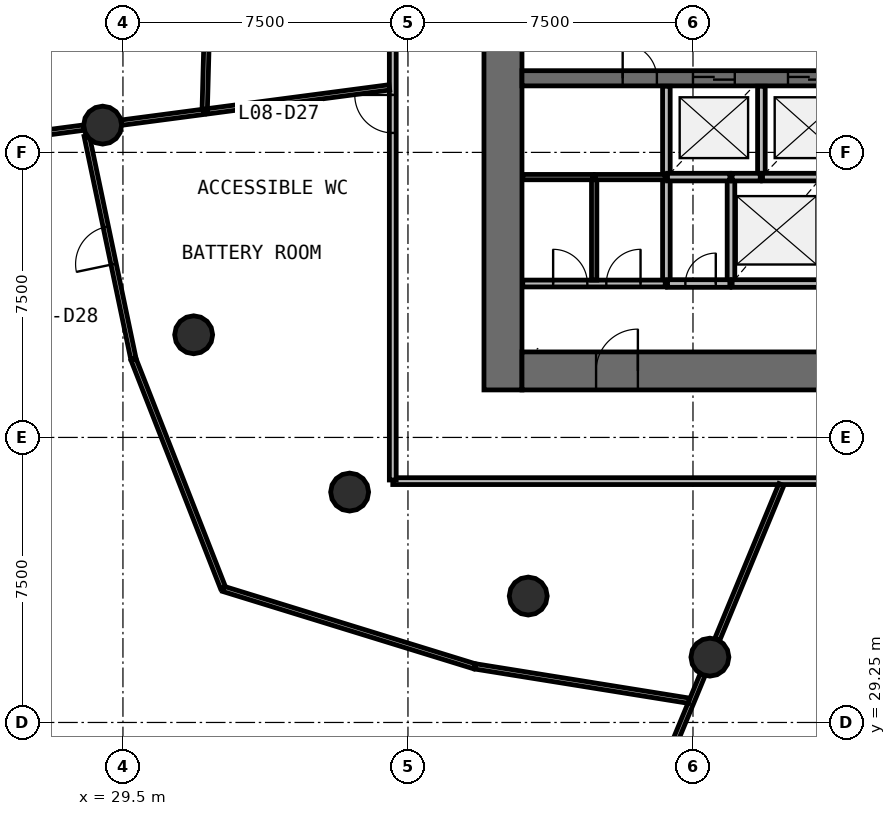
"""IFC4 building model, lengths in metres.
Left out: names, types, materials, properties, quantities, classifications, styles, units other than length and angle.
Written with IfcOpenShell. Run it as: python <this file> out.ifc"""

import sys

from ifc_helpers import new_model, si_unit, direction, frame, frame_2d, origin, origin_2d, place, context, subcontext, project, spatial, rectangle, circle, extrude, source, transform, mapped, element, fill, save


model = new_model("IFC4")
c1 = context("Model", 3, precision=1e-05, world=origin(), true_north=direction((0.0, 1.0)))
c2 = subcontext(c1, "Body", "Model", "MODEL_VIEW")
j1 = project(units=[si_unit("LENGTHUNIT", "METRE"), si_unit("PLANEANGLEUNIT", "RADIAN")], contexts=[c1])
p1 = place(None, origin())
s1 = spatial("IfcSite", under=j1, at=p1, CompositionType="ELEMENT")
p2 = place(p1, origin())
s2 = spatial("IfcBuilding", under=s1, at=p2, CompositionType="ELEMENT")
p3 = place(p2, frame((0.0, 0.0, 35.8)))
s3 = spatial("IfcBuildingStorey", under=s2, at=p3, CompositionType="ELEMENT", Elevation=35.8)
p4 = place(p3, frame((39.5, 58.0, 0.0), z_axis=(0.0, 0.0, 1.0), x_axis=(0.0, -1.0, 0.0)))
e1 = element("IfcWall", 1, at=p4, inside=s3, PredefinedType="SHEAR", context=c2, shape_type="SweptSolid", body=[
    extrude(rectangle(XDim=20.0, YDim=1.0, at=frame_2d((10.0, 0.0))), origin(), (0.0, 0.0, 1.0), 4.4),
])
p5 = place(p4, frame((9.1, 0.0, 0.0)))
e2 = element("IfcOpeningElement", 2, at=p5, cuts=e1, PredefinedType="OPENING", context=c2, shape_type="SweptSolid", body=[
    extrude(rectangle(XDim=1.8, YDim=2.1, at=frame_2d((0.9, 1.05))), frame((0.0, 0.51, 0.0), z_axis=(0.0, -1.0, 0.0), x_axis=(1.0, 0.0, 0.0)), (0.0, 0.0, 1.0), 1.02),
])
p6 = place(p3, frame((40.0, 38.5, 0.0), z_axis=(0.0, 0.0, 1.0), x_axis=(1.0, 0.0, 0.0)))
e3 = element("IfcWall", 3, at=p6, inside=s3, PredefinedType="SHEAR", context=c2, shape_type="SweptSolid", body=[
    extrude(rectangle(XDim=24.0, YDim=1.0, at=frame_2d((12.0, 0.0))), origin(), (0.0, 0.0, 1.0), 4.4),
])
p7 = place(p6, frame((21.45, 0.0, 0.0)))
e4 = element("IfcOpeningElement", 4, at=p7, cuts=e3, PredefinedType="OPENING", context=c2, shape_type="SweptSolid", body=[
    extrude(rectangle(XDim=1.1, YDim=2.1, at=frame_2d((0.55, 1.05))), frame((0.0, 0.51, 0.0), z_axis=(0.0, -1.0, 0.0), x_axis=(1.0, 0.0, 0.0)), (0.0, 0.0, 1.0), 1.02),
])
p8 = place(p6, frame((1.95, 0.0, 0.0)))
e5 = element("IfcOpeningElement", 5, at=p8, cuts=e3, PredefinedType="OPENING", context=c2, shape_type="SweptSolid", body=[
    extrude(rectangle(XDim=1.1, YDim=2.1, at=frame_2d((0.55, 1.05))), frame((0.0, 0.51, 0.0), z_axis=(0.0, -1.0, 0.0), x_axis=(1.0, 0.0, 0.0)), (0.0, 0.0, 1.0), 1.02),
])
p9 = place(p3, frame((40.0, 46.2, 0.0), z_axis=(0.0, 0.0, 1.0), x_axis=(1.0, 0.0, 0.0)))
e6 = element("IfcWall", 6, at=p9, inside=s3, PredefinedType="SHEAR", context=c2, shape_type="SweptSolid", body=[
    extrude(rectangle(XDim=24.0, YDim=0.4, at=frame_2d((12.0, 0.0))), origin(), (0.0, 0.0, 1.0), 4.4),
])
p10 = place(p9, frame((4.5, 0.0, 0.0)))
e7 = element("IfcOpeningElement", 7, at=p10, cuts=e6, PredefinedType="OPENING", context=c2, shape_type="SweptSolid", body=[
    extrude(rectangle(XDim=1.1, YDim=2.1, at=frame_2d((0.55, 1.05))), frame((0.0, 0.21, 0.0), z_axis=(0.0, -1.0, 0.0), x_axis=(1.0, 0.0, 0.0)), (0.0, 0.0, 1.0), 0.42),
])
p11 = place(p9, frame((7.0, 0.0, 0.0)))
e8 = element("IfcOpeningElement", 8, at=p11, cuts=e6, PredefinedType="OPENING", context=c2, shape_type="SweptSolid", body=[
    extrude(rectangle(XDim=1.1, YDim=2.1, at=frame_2d((0.55, 1.05))), frame((0.0, 0.21, 0.0), z_axis=(0.0, -1.0, 0.0), x_axis=(1.0, 0.0, 0.0)), (0.0, 0.0, 1.0), 0.42),
])
p12 = place(p9, frame((9.5, 0.0, 0.0)))
e9 = element("IfcOpeningElement", 9, at=p12, cuts=e6, PredefinedType="OPENING", context=c2, shape_type="SweptSolid", body=[
    extrude(rectangle(XDim=1.1, YDim=2.1, at=frame_2d((0.55, 1.05))), frame((0.0, 0.21, 0.0), z_axis=(0.0, -1.0, 0.0), x_axis=(1.0, 0.0, 0.0)), (0.0, 0.0, 1.0), 0.42),
])
p13 = place(p9, frame((20.45, 0.0, 0.0)))
e10 = element("IfcOpeningElement", 10, at=p13, cuts=e6, PredefinedType="OPENING", context=c2, shape_type="SweptSolid", body=[
    extrude(rectangle(XDim=0.9, YDim=2.1, at=frame_2d((0.45, 1.05))), frame((0.0, 0.21, 0.0), z_axis=(0.0, -1.0, 0.0), x_axis=(1.0, 0.0, 0.0)), (0.0, 0.0, 1.0), 0.42),
])
p14 = place(p9, frame((2.65, 0.0, 0.0)))
e11 = element("IfcOpeningElement", 11, at=p14, cuts=e6, PredefinedType="OPENING", context=c2, shape_type="SweptSolid", body=[
    extrude(rectangle(XDim=0.9, YDim=2.1, at=frame_2d((0.45, 1.05))), frame((0.0, 0.21, 0.0), z_axis=(0.0, -1.0, 0.0), x_axis=(1.0, 0.0, 0.0)), (0.0, 0.0, 1.0), 0.42),
])
p15 = place(p9, frame((11.65, 0.0, 0.0)))
e12 = element("IfcOpeningElement", 12, at=p15, cuts=e6, PredefinedType="OPENING", context=c2, shape_type="SweptSolid", body=[
    extrude(rectangle(XDim=0.9, YDim=2.1, at=frame_2d((0.45, 1.05))), frame((0.0, 0.21, 0.0), z_axis=(0.0, -1.0, 0.0), x_axis=(1.0, 0.0, 0.0)), (0.0, 0.0, 1.0), 0.42),
])
m1 = source(origin(), c2, "Body", "SweptSolid", [
    extrude(circle(Radius=0.5, at=origin_2d()), origin(), (0.0, 0.0, 1.0), 4.4),
])
for number, where, z_axis, x_axis in (
    (13, (28.966, 44.968, 0.0), (0.0, 0.0, 1.0), (1.0, 0.0, 0.0)),
    (14, (31.361, 39.451, 0.0), (0.0, 0.0, 1.0), (1.0, 0.0, 0.0)),
    (15, (35.465, 35.312, 0.0), (0.0, 0.0, 1.0), (1.0, 0.0, 0.0)),
    (16, (40.165, 32.576, 0.0), (0.0, 0.0, 1.0), (1.0, 0.0, 0.0)),
    (17, (44.945, 30.969, 0.0), (0.0, 0.0, 1.0), (1.0, 0.0, 0.0)),
):
    element("IfcColumn", number, at=place(p3, frame(where, z_axis=z_axis, x_axis=x_axis)), inside=s3, PredefinedType="COLUMN", context=c2, shape_type="MappedRepresentation", body=[
        mapped(m1, transform((0.0, 0.0, 0.0), scale=1.0)),
    ])
for number, where, z_axis, x_axis in (
    (18, (43.8, 43.6, 0.0), (0.0, 0.0, 1.0), (0.0, -1.0, 0.0)),
    (19, (45.5, 43.6, 0.0), (0.0, 0.0, 1.0), (0.0, -1.0, 0.0)),
):
    element("IfcWall", number, at=place(p3, frame(where, z_axis=z_axis, x_axis=x_axis)), inside=s3, PredefinedType="SOLIDWALL", context=c2, shape_type="SweptSolid", body=[
        extrude(rectangle(XDim=2.8, YDim=0.2, at=frame_2d((1.4, 0.0))), origin(), (0.0, 0.0, 1.0), 3.95),
    ])
p16 = place(p3, frame((45.53, 40.8, 0.0), z_axis=(0.0, 0.0, 1.0), x_axis=(1.0, 0.0, 0.0)))
e20 = element("IfcWall", 20, at=p16, inside=s3, PredefinedType="SOLIDWALL", context=c2, shape_type="SweptSolid", body=[
    extrude(rectangle(XDim=2.34, YDim=0.2, at=frame_2d((1.17, 0.0))), origin(), (0.0, 0.0, 1.0), 3.95),
])
p17 = place(p3, frame((43.8, 45.99, 0.0), z_axis=(0.0, 0.0, 1.0), x_axis=(0.0, -1.0, 0.0)))
e21 = element("IfcWall", 21, at=p17, inside=s3, PredefinedType="SOLIDWALL", context=c2, shape_type="SweptSolid", body=[
    extrude(rectangle(XDim=2.36, YDim=0.2, at=frame_2d((1.18, 0.0))), origin(), (0.0, 0.0, 1.0), 3.95),
])
p18 = place(p3, frame((46.3, 43.6, 0.0), z_axis=(0.0, 0.0, 1.0), x_axis=(0.0, 1.0, 0.0)))
e22 = element("IfcWall", 22, at=p18, inside=s3, PredefinedType="SOLIDWALL", context=c2, shape_type="SweptSolid", body=[
    extrude(rectangle(XDim=2.39, YDim=0.2, at=frame_2d((1.195, 0.0))), origin(), (0.0, 0.0, 1.0), 3.95),
])
p19 = place(p3, frame((43.83, 43.6, 0.0), z_axis=(0.0, 0.0, 1.0), x_axis=(1.0, 0.0, 0.0)))
e23 = element("IfcWall", 23, at=p19, inside=s3, PredefinedType="SOLIDWALL", context=c2, shape_type="SweptSolid", body=[
    extrude(rectangle(XDim=1.64, YDim=0.2, at=frame_2d((0.82, 0.0))), origin(), (0.0, 0.0, 1.0), 3.95),
])
p20 = place(p3, frame((43.83, 40.8, 0.0), z_axis=(0.0, 0.0, 1.0), x_axis=(1.0, 0.0, 0.0)))
e24 = element("IfcWall", 24, at=p20, inside=s3, PredefinedType="SOLIDWALL", context=c2, shape_type="SweptSolid", body=[
    extrude(rectangle(XDim=1.64, YDim=0.2, at=frame_2d((0.82, 0.0))), origin(), (0.0, 0.0, 1.0), 3.95),
])
p21 = place(p20, frame((0.47, 0.0, 0.0)))
e25 = element("IfcOpeningElement", 25, at=p21, cuts=e24, PredefinedType="OPENING", context=c2, shape_type="SweptSolid", body=[
    extrude(rectangle(XDim=0.8, YDim=2.1, at=frame_2d((0.4, 1.05))), frame((0.0, 0.11, 0.0), z_axis=(0.0, -1.0, 0.0), x_axis=(1.0, 0.0, 0.0)), (0.0, 0.0, 1.0), 0.22),
])
p22 = place(p3, frame((46.33, 43.6, 0.0), z_axis=(0.0, 0.0, 1.0), x_axis=(1.0, 0.0, 0.0)))
e26 = element("IfcWall", 26, at=p22, inside=s3, PredefinedType="SOLIDWALL", context=c2, shape_type="SweptSolid", body=[
    extrude(rectangle(XDim=1.54, YDim=0.2, at=frame_2d((0.77, 0.0))), origin(), (0.0, 0.0, 1.0), 3.95),
])
p23 = place(p3, frame((45.53, 43.6, 0.0), z_axis=(0.0, 0.0, 1.0), x_axis=(1.0, 0.0, 0.0)))
e27 = element("IfcWall", 27, at=p23, inside=s3, PredefinedType="SOLIDWALL", context=c2, shape_type="SweptSolid", body=[
    extrude(rectangle(XDim=0.74, YDim=0.2, at=frame_2d((0.37, 0.0))), origin(), (0.0, 0.0, 1.0), 3.95),
])
p24 = place(p3, frame((67.4, 35.6, 0.0), z_axis=(0.0, 0.0, 1.0), x_axis=(-1.0, 0.0, 0.0)))
e28 = element("IfcWall", 28, at=p24, inside=s3, PredefinedType="PARTITIONING", context=c2, shape_type="SweptSolid", body=[
    extrude(rectangle(XDim=30.8, YDim=0.18, at=frame_2d((15.4, 0.0))), origin(), (0.0, 0.0, 1.0), 3.05),
])
p25 = place(p24, frame((14.95, 0.0, 0.0)))
e29 = element("IfcOpeningElement", 29, at=p25, cuts=e28, PredefinedType="OPENING", context=c2, shape_type="SweptSolid", body=[
    extrude(rectangle(XDim=1.0, YDim=2.1, at=frame_2d((0.5, 1.05))), frame((0.0, 0.1, 0.0), z_axis=(0.0, -1.0, 0.0), x_axis=(1.0, 0.0, 0.0)), (0.0, 0.0, 1.0), 0.2),
])
p26 = place(p24, frame((12.55, 0.0, 0.0)))
e30 = element("IfcOpeningElement", 30, at=p26, cuts=e28, PredefinedType="OPENING", context=c2, shape_type="SweptSolid", body=[
    extrude(rectangle(XDim=1.0, YDim=2.1, at=frame_2d((0.5, 1.05))), frame((0.0, 0.1, 0.0), z_axis=(0.0, -1.0, 0.0), x_axis=(1.0, 0.0, 0.0)), (0.0, 0.0, 1.0), 0.2),
])
p27 = place(p3, frame((36.6, 35.63, 0.0), z_axis=(0.0, 0.0, 1.0), x_axis=(0.0, 1.0, 0.0)))
e31 = element("IfcWall", 31, at=p27, inside=s3, PredefinedType="PARTITIONING", context=c2, shape_type="SweptSolid", body=[
    extrude(rectangle(XDim=23.583, YDim=0.18, at=frame_2d((11.791, 0.0))), origin(), (0.0, 0.0, 1.0), 3.05),
])
p28 = place(p27, frame((16.032, 0.0, 0.0)))
e32 = element("IfcOpeningElement", 32, at=p28, cuts=e31, PredefinedType="OPENING", context=c2, shape_type="SweptSolid", body=[
    extrude(rectangle(XDim=0.9, YDim=2.1, at=frame_2d((0.45, 1.05))), frame((0.0, 0.1, 0.0), z_axis=(0.0, -1.0, 0.0), x_axis=(1.0, 0.0, 0.0)), (0.0, 0.0, 1.0), 0.2),
])
p29 = place(p27, frame((13.232, 0.0, 0.0)))
e33 = element("IfcOpeningElement", 33, at=p29, cuts=e31, PredefinedType="OPENING", context=c2, shape_type="SweptSolid", body=[
    extrude(rectangle(XDim=0.9, YDim=2.1, at=frame_2d((0.45, 1.05))), frame((0.0, 0.1, 0.0), z_axis=(0.0, -1.0, 0.0), x_axis=(1.0, 0.0, 0.0)), (0.0, 0.0, 1.0), 0.2),
])
p30 = place(p27, frame((11.433, 0.0, 0.0)))
e34 = element("IfcOpeningElement", 34, at=p30, cuts=e31, PredefinedType="OPENING", context=c2, shape_type="SweptSolid", body=[
    extrude(rectangle(XDim=0.9, YDim=2.1, at=frame_2d((0.45, 1.05))), frame((0.0, 0.1, 0.0), z_axis=(0.0, -1.0, 0.0), x_axis=(1.0, 0.0, 0.0)), (0.0, 0.0, 1.0), 0.2),
])
p31 = place(p27, frame((9.133, 0.0, 0.0)))
e35 = element("IfcOpeningElement", 35, at=p31, cuts=e31, PredefinedType="OPENING", context=c2, shape_type="SweptSolid", body=[
    extrude(rectangle(XDim=1.0, YDim=2.1, at=frame_2d((0.5, 1.05))), frame((0.0, 0.1, 0.0), z_axis=(0.0, -1.0, 0.0), x_axis=(1.0, 0.0, 0.0)), (0.0, 0.0, 1.0), 0.2),
])
p32 = place(p27, frame((19.133, 0.0, 0.0)))
e36 = element("IfcOpeningElement", 36, at=p32, cuts=e31, PredefinedType="OPENING", context=c2, shape_type="SweptSolid", body=[
    extrude(rectangle(XDim=1.0, YDim=2.1, at=frame_2d((0.5, 1.05))), frame((0.0, 0.1, 0.0), z_axis=(0.0, -1.0, 0.0), x_axis=(1.0, 0.0, 0.0)), (0.0, 0.0, 1.0), 0.2),
])
p33 = place(p3, frame((40.02, 40.8, 0.0), z_axis=(0.0, 0.0, 1.0), x_axis=(1.0, 0.0, 0.0)))
e37 = element("IfcWall", 37, at=p33, inside=s3, PredefinedType="PARTITIONING", context=c2, shape_type="SweptSolid", body=[
    extrude(rectangle(XDim=3.75, YDim=0.18, at=frame_2d((1.875, 0.0))), origin(), (0.0, 0.0, 1.0), 3.95),
])
p34 = place(p33, frame((0.8, 0.0, 0.0)))
e38 = element("IfcOpeningElement", 38, at=p34, cuts=e37, PredefinedType="OPENING", context=c2, shape_type="SweptSolid", body=[
    extrude(rectangle(XDim=0.9, YDim=2.1, at=frame_2d((0.45, 1.05))), frame((0.0, 0.1, 0.0), z_axis=(0.0, -1.0, 0.0), x_axis=(1.0, 0.0, 0.0)), (0.0, 0.0, 1.0), 0.2),
])
p35 = place(p33, frame((2.2, 0.0, 0.0)))
e39 = element("IfcOpeningElement", 39, at=p35, cuts=e37, PredefinedType="OPENING", context=c2, shape_type="SweptSolid", body=[
    extrude(rectangle(XDim=0.9, YDim=2.1, at=frame_2d((0.45, 1.05))), frame((0.0, 0.1, 0.0), z_axis=(0.0, -1.0, 0.0), x_axis=(1.0, 0.0, 0.0)), (0.0, 0.0, 1.0), 0.2),
])
p36 = place(p3, frame((28.466, 44.902, 0.0), z_axis=(0.0, 0.0, 1.0), x_axis=(-0.991446586451, -0.130513088287, 0.0)))
e40 = element("IfcWall", 40, at=p36, inside=s3, PredefinedType="PARTITIONING", context=c2, shape_type="SweptSolid", body=[
    extrude(rectangle(XDim=11.86, YDim=0.14, at=frame_2d((5.93, 0.0))), origin(), (0.0, 0.0, 1.0), 3.05),
])
p37 = place(p3, frame((41.247, 22.04, 0.0), z_axis=(0.0, 0.0, 1.0), x_axis=(0.382672728165, 0.923883966264, 0.0)))
e41 = element("IfcWall", 41, at=p37, inside=s3, PredefinedType="PARTITIONING", context=c2, shape_type="SweptSolid", body=[
    extrude(rectangle(XDim=9.16, YDim=0.14, at=frame_2d((4.58, 0.0))), origin(), (0.0, 0.0, 1.0), 3.05),
])
p38 = place(p3, frame((32.145, 32.764, 0.0), z_axis=(0.0, 0.0, 1.0), x_axis=(0.955628382182, -0.294574939816, 0.0)))
e42 = element("IfcWall", 42, at=p38, inside=s3, PredefinedType="PARTITIONING", context=c2, shape_type="SweptSolid", body=[
    extrude(rectangle(XDim=6.91, YDim=0.14, at=frame_2d((3.455, 0.0))), origin(), (0.0, 0.0, 1.0), 3.05),
])
p39 = place(p3, frame((29.78, 38.796, 0.0), z_axis=(0.0, 0.0, 1.0), x_axis=(0.364958848298, -0.931023651176, 0.0)))
e43 = element("IfcWall", 43, at=p39, inside=s3, PredefinedType="PARTITIONING", context=c2, shape_type="SweptSolid", body=[
    extrude(rectangle(XDim=6.449, YDim=0.14, at=frame_2d((3.224, 0.0))), origin(), (0.0, 0.0, 1.0), 3.05),
])
p40 = place(p3, frame((29.774, 38.826, 0.0), z_axis=(0.0, 0.0, 1.0), x_axis=(-0.20499122911, 0.978763810113, 0.0)))
e44 = element("IfcWall", 44, at=p40, inside=s3, PredefinedType="PARTITIONING", context=c2, shape_type="SweptSolid", body=[
    extrude(rectangle(XDim=5.988, YDim=0.14, at=frame_2d((2.994, 0.0))), origin(), (0.0, 0.0, 1.0), 3.05),
])
p41 = place(p40, frame((2.538, 0.0, 0.0)))
e45 = element("IfcOpeningElement", 45, at=p41, cuts=e44, PredefinedType="OPENING", context=c2, shape_type="SweptSolid", body=[
    extrude(rectangle(XDim=1.0, YDim=2.1, at=frame_2d((0.5, 1.05))), frame((0.0, 0.08, 0.0), z_axis=(0.0, -1.0, 0.0), x_axis=(1.0, 0.0, 0.0)), (0.0, 0.0, 1.0), 0.16),
])
p42 = place(p3, frame((38.777, 30.724, 0.0), z_axis=(0.0, 0.0, 1.0), x_axis=(0.987350770866, -0.158551112488, 0.0)))
e46 = element("IfcWall", 46, at=p42, inside=s3, PredefinedType="PARTITIONING", context=c2, shape_type="SweptSolid", body=[
    extrude(rectangle(XDim=5.69, YDim=0.14, at=frame_2d((2.845, 0.0))), origin(), (0.0, 0.0, 1.0), 3.05),
])
p43 = place(p3, frame((31.793, 50.66, 0.0), z_axis=(0.0, 0.0, 1.0), x_axis=(-0.026785082404, -0.999641215317, 0.0)))
e47 = element("IfcWall", 47, at=p43, inside=s3, PredefinedType="PARTITIONING", context=c2, shape_type="SweptSolid", body=[
    extrude(rectangle(XDim=5.341, YDim=0.14, at=frame_2d((2.671, 0.0))), origin(), (0.0, 0.0, 1.0), 3.05),
])
p44 = place(p3, frame((36.51, 45.961, 0.0), z_axis=(0.0, 0.0, 1.0), x_axis=(-0.991443283178, -0.130538179246, 0.0)))
e48 = element("IfcWall", 48, at=p44, inside=s3, PredefinedType="PARTITIONING", context=c2, shape_type="SweptSolid", body=[
    extrude(rectangle(XDim=4.831, YDim=0.14, at=frame_2d((2.416, 0.0))), origin(), (0.0, 0.0, 1.0), 3.05),
])
p45 = place(p3, frame((46.826, 35.51, 0.0), z_axis=(0.0, 0.0, 1.0), x_axis=(-0.382672831764, -0.923883923353, 0.0)))
e49 = element("IfcWall", 49, at=p45, inside=s3, PredefinedType="PARTITIONING", context=c2, shape_type="SweptSolid", body=[
    extrude(rectangle(XDim=4.41, YDim=0.14, at=frame_2d((2.205, 0.0))), origin(), (0.0, 0.0, 1.0), 3.05),
])
p46 = place(p3, frame((41.9, 40.89, 0.0), z_axis=(0.0, 0.0, 1.0), x_axis=(0.0, 1.0, 0.0)))
e50 = element("IfcWall", 50, at=p46, inside=s3, PredefinedType="PARTITIONING", context=c2, shape_type="SweptSolid", body=[
    extrude(rectangle(XDim=2.71, YDim=0.14, at=frame_2d((1.355, 0.0))), origin(), (0.0, 0.0, 1.0), 3.05),
])
p47 = place(p3, frame((31.621, 45.317, 0.0), z_axis=(0.0, 0.0, 1.0), x_axis=(-0.991455060392, -0.130448699582, 0.0)))
e51 = element("IfcWall", 51, at=p47, inside=s3, PredefinedType="PARTITIONING", context=c2, shape_type="SweptSolid", body=[
    extrude(rectangle(XDim=2.173, YDim=0.14, at=frame_2d((1.086, 0.0))), origin(), (0.0, 0.0, 1.0), 3.05),
])
p48 = place(p3, frame((43.77, 43.6, 0.0), z_axis=(0.0, 0.0, 1.0), x_axis=(-1.0, 0.0, 0.0)))
e52 = element("IfcWall", 52, at=p48, inside=s3, PredefinedType="PARTITIONING", context=c2, shape_type="SweptSolid", body=[
    extrude(rectangle(XDim=1.84, YDim=0.14, at=frame_2d((0.92, 0.0))), origin(), (0.0, 0.0, 1.0), 3.05),
])
p49 = place(p3, frame((41.87, 43.6, 0.0), z_axis=(0.0, 0.0, 1.0), x_axis=(-1.0, 0.0, 0.0)))
e53 = element("IfcWall", 53, at=p49, inside=s3, PredefinedType="PARTITIONING", context=c2, shape_type="SweptSolid", body=[
    extrude(rectangle(XDim=1.85, YDim=0.14, at=frame_2d((0.925, 0.0))), origin(), (0.0, 0.0, 1.0), 3.05),
])
m2 = source(origin(), c2, "Body", "SweptSolid", [
    extrude(rectangle(XDim=1.1, YDim=2.1, at=frame_2d((0.55, 1.05))), frame((0.0, 0.025, 0.0), z_axis=(0.0, -1.0, 0.0), x_axis=(1.0, 0.0, 0.0)), (0.0, 0.0, 1.0), 0.05),
])
p50 = place(p10, origin())
e54 = element("IfcDoor", 54, at=p50, inside=s3, OperationType="DOUBLE_DOOR_SLIDING", PredefinedType="USERDEFINED", context=c2, shape_type="MappedRepresentation", body=[
    mapped(m2, transform((0.0, 0.0, 0.0), scale=1.0)),
])
fill(e7, e54)
p51 = place(p11, origin())
e55 = element("IfcDoor", 55, at=p51, inside=s3, OperationType="DOUBLE_DOOR_SLIDING", PredefinedType="USERDEFINED", context=c2, shape_type="MappedRepresentation", body=[
    mapped(m2, transform((0.0, 0.0, 0.0), scale=1.0)),
])
fill(e8, e55)
m3 = source(origin(), c2, "Body", "SweptSolid", [
    extrude(rectangle(XDim=0.8, YDim=2.1, at=frame_2d((0.4, 1.05))), frame((0.0, 0.025, 0.0), z_axis=(0.0, -1.0, 0.0), x_axis=(1.0, 0.0, 0.0)), (0.0, 0.0, 1.0), 0.05),
])
p52 = place(p21, origin())
e56 = element("IfcDoor", 56, at=p52, inside=s3, OperationType="SINGLE_SWING_RIGHT", PredefinedType="DOOR", context=c2, shape_type="MappedRepresentation", body=[
    mapped(m3, transform((0.0, 0.0, 0.0), scale=1.0)),
])
fill(e25, e56)
m4 = source(origin(), c2, "Body", "SweptSolid", [
    extrude(rectangle(XDim=1.1, YDim=2.1, at=frame_2d((0.55, 1.05))), frame((0.0, 0.025, 0.0), z_axis=(0.0, -1.0, 0.0), x_axis=(1.0, 0.0, 0.0)), (0.0, 0.0, 1.0), 0.05),
])
p53 = place(p8, origin())
e57 = element("IfcDoor", 57, at=p53, inside=s3, OperationType="SINGLE_SWING_RIGHT", PredefinedType="DOOR", context=c2, shape_type="MappedRepresentation", body=[
    mapped(m4, transform((0.0, 0.0, 0.0), scale=1.0)),
])
fill(e5, e57)
m5 = source(origin(), c2, "Body", "SweptSolid", [
    extrude(rectangle(XDim=1.0, YDim=2.1, at=frame_2d((0.5, 1.05))), frame((0.0, 0.025, 0.0), z_axis=(0.0, -1.0, 0.0), x_axis=(1.0, 0.0, 0.0)), (0.0, 0.0, 1.0), 0.05),
])
p54 = place(p31, origin())
e58 = element("IfcDoor", 58, at=p54, inside=s3, OperationType="SINGLE_SWING_RIGHT", PredefinedType="DOOR", context=c2, shape_type="MappedRepresentation", body=[
    mapped(m5, transform((0.0, 0.0, 0.0), scale=1.0)),
])
fill(e35, e58)
p55 = place(p41, origin())
e59 = element("IfcDoor", 59, at=p55, inside=s3, OperationType="SINGLE_SWING_LEFT", PredefinedType="DOOR", context=c2, shape_type="MappedRepresentation", body=[
    mapped(m5, transform((0.0, 0.0, 0.0), scale=1.0)),
])
fill(e45, e59)
m6 = source(origin(), c2, "Body", "SweptSolid", [
    extrude(rectangle(XDim=0.9, YDim=2.1, at=frame_2d((0.45, 1.05))), frame((0.0, 0.025, 0.0), z_axis=(0.0, -1.0, 0.0), x_axis=(1.0, 0.0, 0.0)), (0.0, 0.0, 1.0), 0.05),
])
p56 = place(p34, origin())
e60 = element("IfcDoor", 60, at=p56, inside=s3, OperationType="SINGLE_SWING_LEFT", PredefinedType="DOOR", context=c2, shape_type="MappedRepresentation", body=[
    mapped(m6, transform((0.0, 0.0, 0.0), scale=1.0)),
])
fill(e38, e60)
p57 = place(p35, origin())
e61 = element("IfcDoor", 61, at=p57, inside=s3, OperationType="SINGLE_SWING_RIGHT", PredefinedType="DOOR", context=c2, shape_type="MappedRepresentation", body=[
    mapped(m6, transform((0.0, 0.0, 0.0), scale=1.0)),
])
fill(e39, e61)
p58 = place(p14, origin())
e62 = element("IfcDoor", 62, at=p58, inside=s3, OperationType="SINGLE_SWING_LEFT", PredefinedType="DOOR", context=c2, shape_type="MappedRepresentation", body=[
    mapped(m6, transform((0.0, 0.0, 0.0), scale=1.0)),
])
fill(e11, e62)
save(model, sys.argv[1])
